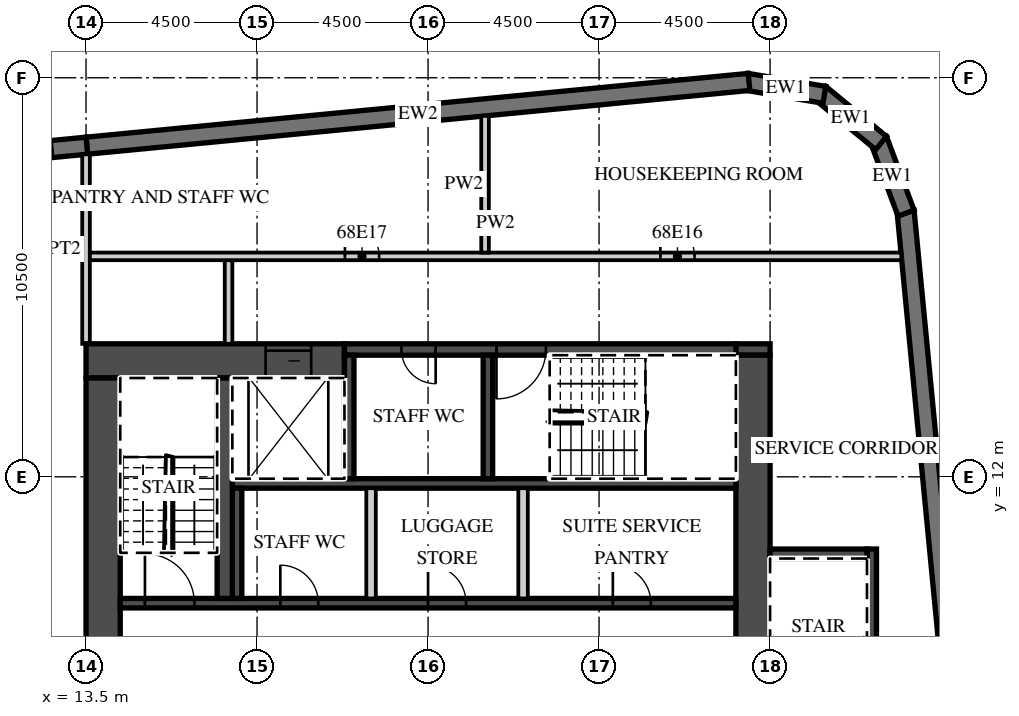
"""IFC4 building model, lengths in metres.
Left out: names, types, materials, properties, quantities, classifications, styles, units other than length and angle.
Written with IfcOpenShell. Run it as: python <this file> out.ifc"""

import sys

from ifc_helpers import new_model, si_unit, direction, frame, frame_2d, origin, place, context, subcontext, project, spatial, polyline, rectangle, outline, extrude, element, fill, save


model = new_model("IFC4")
c1 = context("Model", 3, precision=1e-05, world=origin(), true_north=direction((0.0, 1.0)))
c2 = subcontext(c1, "Body", "Model", "MODEL_VIEW")
j1 = project(units=[si_unit("LENGTHUNIT", "METRE"), si_unit("PLANEANGLEUNIT", "RADIAN")], contexts=[c1])
p1 = place(None, origin())
s1 = spatial("IfcSite", under=j1, at=p1, CompositionType="ELEMENT")
p2 = place(p1, origin())
s2 = spatial("IfcBuilding", under=s1, at=p2, CompositionType="ELEMENT")
p3 = place(p2, frame((0.0, 0.0, 275.1)))
s3 = spatial("IfcBuildingStorey", under=s2, at=p3, CompositionType="ELEMENT", Elevation=275.1)
p4 = place(p3, frame((38.132, -12.858, 0.0), z_axis=(0.0, 0.0, 1.0), x_axis=(-0.095847749461, 0.995396006082, 0.0)))
e1 = element("IfcWall", 1, at=p4, inside=s3, PredefinedType="SOLIDWALL", context=c2, shape_type="SweptSolid", body=[
    extrude(rectangle(XDim=32.0, YDim=0.45, at=frame_2d((16.0, 0.0))), origin(), (0.0, 0.0, 1.0), 3.02),
])
p5 = place(p3, frame((35.078, 18.938, 0.0), z_axis=(0.0, 0.0, 1.0), x_axis=(-0.350192909346, 0.936677599948, 0.0)))
e2 = element("IfcWall", 2, at=p5, inside=s3, PredefinedType="SOLIDWALL", context=c2, shape_type="SweptSolid", body=[
    extrude(outline(polyline([(0.0, -0.225), (2.071, -0.225), (1.95, 0.225), (0.121, 0.225), (0.0, -0.225)])), origin(), (0.0, 0.0, 1.0), 3.02),
])
p6 = place(p3, frame((34.421, 20.782, 0.0), z_axis=(0.0, 0.0, 1.0), x_axis=(-0.771593176315, 0.636116318187, 0.0)))
e3 = element("IfcWall", 3, at=p6, inside=s3, PredefinedType="SOLIDWALL", context=c2, shape_type="SweptSolid", body=[
    extrude(outline(polyline([(0.0, -0.225), (2.071, -0.225), (1.95, 0.225), (0.12, 0.225), (0.0, -0.225)])), origin(), (0.0, 0.0, 1.0), 3.02),
])
p7 = place(p3, frame((32.929, 22.051, 0.0), z_axis=(0.0, 0.0, 1.0), x_axis=(-0.986298144721, 0.164972633245, 0.0)))
e4 = element("IfcWall", 4, at=p7, inside=s3, PredefinedType="SOLIDWALL", context=c2, shape_type="SweptSolid", body=[
    extrude(outline(polyline([(0.0, -0.225), (2.07, -0.225), (1.95, 0.225), (0.121, 0.225), (0.0, -0.225)])), origin(), (0.0, 0.0, 1.0), 3.02),
])
p8 = place(p3, frame((30.946, 22.391, 0.0), z_axis=(0.0, 0.0, 1.0), x_axis=(-0.995396397117, -0.095843688398, 0.0)))
e5 = element("IfcWall", 5, at=p8, inside=s3, PredefinedType="SOLIDWALL", context=c2, shape_type="SweptSolid", body=[
    extrude(rectangle(XDim=17.505, YDim=0.45, at=frame_2d((8.752, 0.0))), origin(), (0.0, 0.0, 1.0), 3.02),
])
p9 = place(p3, frame((13.521, 20.713, 0.0), z_axis=(0.0, 0.0, 1.0), x_axis=(-0.995396277313, -0.095844932638, 0.0)))
e6 = element("IfcWall", 6, at=p9, inside=s3, PredefinedType="SOLIDWALL", context=c2, shape_type="SweptSolid", body=[
    extrude(rectangle(XDim=51.495, YDim=0.45, at=frame_2d((25.748, 0.0))), origin(), (0.0, 0.0, 1.0), 3.02),
])
p10 = place(p9, frame((0.91, 0.0, 0.45)))
e7 = element("IfcOpeningElement", 7, at=p10, cuts=e6, PredefinedType="OPENING", context=c2, shape_type="SweptSolid", body=[
    extrude(rectangle(XDim=2.7, YDim=2.25, at=frame_2d((1.35, 1.125))), frame((0.0, 0.235, 0.0), z_axis=(0.0, -1.0, 0.0), x_axis=(1.0, 0.0, 0.0)), (0.0, 0.0, 1.0), 0.47),
])
p11 = place(p9, frame((5.431, 0.0, 0.45)))
e8 = element("IfcOpeningElement", 8, at=p11, cuts=e6, PredefinedType="OPENING", context=c2, shape_type="SweptSolid", body=[
    extrude(rectangle(XDim=2.7, YDim=2.25, at=frame_2d((1.35, 1.125))), frame((0.0, 0.235, 0.0), z_axis=(0.0, -1.0, 0.0), x_axis=(1.0, 0.0, 0.0)), (0.0, 0.0, 1.0), 0.47),
])
p12 = place(p9, frame((9.952, 0.0, 0.45)))
e9 = element("IfcOpeningElement", 9, at=p12, cuts=e6, PredefinedType="OPENING", context=c2, shape_type="SweptSolid", body=[
    extrude(rectangle(XDim=2.7, YDim=2.25, at=frame_2d((1.35, 1.125))), frame((0.0, 0.235, 0.0), z_axis=(0.0, -1.0, 0.0), x_axis=(1.0, 0.0, 0.0)), (0.0, 0.0, 1.0), 0.47),
])
p13 = place(p9, frame((14.473, 0.0, 0.45)))
e10 = element("IfcOpeningElement", 10, at=p13, cuts=e6, PredefinedType="OPENING", context=c2, shape_type="SweptSolid", body=[
    extrude(rectangle(XDim=2.7, YDim=2.25, at=frame_2d((1.35, 1.125))), frame((0.0, 0.235, 0.0), z_axis=(0.0, -1.0, 0.0), x_axis=(1.0, 0.0, 0.0)), (0.0, 0.0, 1.0), 0.47),
])
p14 = place(p9, frame((18.994, 0.0, 0.45)))
e11 = element("IfcOpeningElement", 11, at=p14, cuts=e6, PredefinedType="OPENING", context=c2, shape_type="SweptSolid", body=[
    extrude(rectangle(XDim=2.7, YDim=2.25, at=frame_2d((1.35, 1.125))), frame((0.0, 0.235, 0.0), z_axis=(0.0, -1.0, 0.0), x_axis=(1.0, 0.0, 0.0)), (0.0, 0.0, 1.0), 0.47),
])
p15 = place(p9, frame((23.514, 0.0, 0.45)))
e12 = element("IfcOpeningElement", 12, at=p15, cuts=e6, PredefinedType="OPENING", context=c2, shape_type="SweptSolid", body=[
    extrude(rectangle(XDim=2.7, YDim=2.25, at=frame_2d((1.35, 1.125))), frame((0.0, 0.235, 0.0), z_axis=(0.0, -1.0, 0.0), x_axis=(1.0, 0.0, 0.0)), (0.0, 0.0, 1.0), 0.47),
])
p16 = place(p9, frame((28.035, 0.0, 0.45)))
e13 = element("IfcOpeningElement", 13, at=p16, cuts=e6, PredefinedType="OPENING", context=c2, shape_type="SweptSolid", body=[
    extrude(rectangle(XDim=2.7, YDim=2.25, at=frame_2d((1.35, 1.125))), frame((0.0, 0.235, 0.0), z_axis=(0.0, -1.0, 0.0), x_axis=(1.0, 0.0, 0.0)), (0.0, 0.0, 1.0), 0.47),
])
p17 = place(p9, frame((32.556, 0.0, 0.45)))
e14 = element("IfcOpeningElement", 14, at=p17, cuts=e6, PredefinedType="OPENING", context=c2, shape_type="SweptSolid", body=[
    extrude(rectangle(XDim=2.7, YDim=2.25, at=frame_2d((1.35, 1.125))), frame((0.0, 0.235, 0.0), z_axis=(0.0, -1.0, 0.0), x_axis=(1.0, 0.0, 0.0)), (0.0, 0.0, 1.0), 0.47),
])
p18 = place(p9, frame((37.077, 0.0, 0.45)))
e15 = element("IfcOpeningElement", 15, at=p18, cuts=e6, PredefinedType="OPENING", context=c2, shape_type="SweptSolid", body=[
    extrude(rectangle(XDim=2.7, YDim=2.25, at=frame_2d((1.35, 1.125))), frame((0.0, 0.235, 0.0), z_axis=(0.0, -1.0, 0.0), x_axis=(1.0, 0.0, 0.0)), (0.0, 0.0, 1.0), 0.47),
])
p19 = place(p9, frame((41.598, 0.0, 0.45)))
e16 = element("IfcOpeningElement", 16, at=p19, cuts=e6, PredefinedType="OPENING", context=c2, shape_type="SweptSolid", body=[
    extrude(rectangle(XDim=2.7, YDim=2.25, at=frame_2d((1.35, 1.125))), frame((0.0, 0.235, 0.0), z_axis=(0.0, -1.0, 0.0), x_axis=(1.0, 0.0, 0.0)), (0.0, 0.0, 1.0), 0.47),
])
p20 = place(p9, frame((46.118, 0.0, 0.45)))
e17 = element("IfcOpeningElement", 17, at=p20, cuts=e6, PredefinedType="OPENING", context=c2, shape_type="SweptSolid", body=[
    extrude(rectangle(XDim=2.7, YDim=2.25, at=frame_2d((1.35, 1.125))), frame((0.0, 0.235, 0.0), z_axis=(0.0, -1.0, 0.0), x_axis=(1.0, 0.0, 0.0)), (0.0, 0.0, 1.0), 0.47),
])
p21 = place(p3, frame((13.5, 15.5, 0.0), z_axis=(0.0, 0.0, 1.0), x_axis=(0.0, 1.0, 0.0)))
e18 = element("IfcWall", 18, at=p21, inside=s3, PredefinedType="PARTITIONING", context=c2, shape_type="SweptSolid", body=[
    extrude(rectangle(XDim=4.985, YDim=0.2, at=frame_2d((2.493, 0.0))), origin(), (0.0, 0.0, 1.0), 3.02),
])
p22 = place(p3, frame((13.5, 15.05, 0.0), z_axis=(0.0, 0.0, 1.0), x_axis=(1.0, 0.0, 0.0)))
e19 = element("IfcWall", 19, at=p22, inside=s3, PredefinedType="SHEAR", context=c2, shape_type="SweptSolid", body=[
    extrude(rectangle(XDim=6.8, YDim=0.9, at=frame_2d((3.4, 0.0))), origin(), (0.0, 0.0, 1.0), 3.02),
])
p23 = place(p22, frame((4.725, 0.0, 0.0)))
e20 = element("IfcOpeningElement", 20, at=p23, cuts=e19, PredefinedType="OPENING", context=c2, shape_type="SweptSolid", body=[
    extrude(rectangle(XDim=1.2, YDim=2.1, at=frame_2d((0.6, 1.05))), frame((0.0, 0.46, 0.0), z_axis=(0.0, -1.0, 0.0), x_axis=(1.0, 0.0, 0.0)), (0.0, 0.0, 1.0), 0.92),
])
p24 = place(p3, frame((30.6, 15.35, 0.0), z_axis=(0.0, 0.0, 1.0), x_axis=(1.0, 0.0, 0.0)))
e21 = element("IfcWall", 21, at=p24, inside=s3, PredefinedType="SHEAR", context=c2, shape_type="SweptSolid", body=[
    extrude(rectangle(XDim=0.9, YDim=0.3, at=frame_2d((0.45, 0.0))), origin(), (0.0, 0.0, 1.0), 3.02),
])
p25 = place(p3, frame((20.3, 15.35, 0.0), z_axis=(0.0, 0.0, 1.0), x_axis=(1.0, 0.0, 0.0)))
e22 = element("IfcWall", 22, at=p25, inside=s3, PredefinedType="SHEAR", context=c2, shape_type="SweptSolid", body=[
    extrude(rectangle(XDim=10.3, YDim=0.3, at=frame_2d((5.15, 0.0))), origin(), (0.0, 0.0, 1.0), 3.02),
])
p26 = place(p25, frame((4.0, 0.0, 0.0)))
e23 = element("IfcOpeningElement", 23, at=p26, cuts=e22, PredefinedType="OPENING", context=c2, shape_type="SweptSolid", body=[
    extrude(rectangle(XDim=1.3, YDim=2.1, at=frame_2d((0.65, 1.05))), frame((0.0, 0.16, 0.0), z_axis=(0.0, -1.0, 0.0), x_axis=(1.0, 0.0, 0.0)), (0.0, 0.0, 1.0), 0.32),
])
p27 = place(p25, frame((1.5, 0.0, 0.0)))
e24 = element("IfcOpeningElement", 24, at=p27, cuts=e22, PredefinedType="OPENING", context=c2, shape_type="SweptSolid", body=[
    extrude(rectangle(XDim=0.9, YDim=2.1, at=frame_2d((0.45, 1.05))), frame((0.0, 0.16, 0.0), z_axis=(0.0, -1.0, 0.0), x_axis=(1.0, 0.0, 0.0)), (0.0, 0.0, 1.0), 0.32),
])
p28 = place(p3, frame((31.05, 2.4, 0.0), z_axis=(0.0, 0.0, 1.0), x_axis=(0.0, 1.0, 0.0)))
e25 = element("IfcWall", 25, at=p28, inside=s3, PredefinedType="SHEAR", context=c2, shape_type="SweptSolid", body=[
    extrude(rectangle(XDim=12.8, YDim=0.9, at=frame_2d((6.4, 0.0))), origin(), (0.0, 0.0, 1.0), 3.02),
])
p29 = place(p28, frame((0.2, 0.0, 0.0)))
e26 = element("IfcOpeningElement", 26, at=p29, cuts=e25, PredefinedType="OPENING", context=c2, shape_type="SweptSolid", body=[
    extrude(rectangle(XDim=1.1, YDim=2.1, at=frame_2d((0.55, 1.05))), frame((0.0, 0.46, 0.0), z_axis=(0.0, -1.0, 0.0), x_axis=(1.0, 0.0, 0.0)), (0.0, 0.0, 1.0), 0.92),
])
p30 = place(p3, frame((13.95, 2.4, 0.0), z_axis=(0.0, 0.0, 1.0), x_axis=(0.0, 1.0, 0.0)))
e27 = element("IfcWall", 27, at=p30, inside=s3, PredefinedType="SHEAR", context=c2, shape_type="SweptSolid", body=[
    extrude(rectangle(XDim=12.2, YDim=0.9, at=frame_2d((6.1, 0.0))), origin(), (0.0, 0.0, 1.0), 3.02),
])
p31 = place(p3, frame((14.4, 8.675, 0.0), z_axis=(0.0, 0.0, 1.0), x_axis=(1.0, 0.0, 0.0)))
e28 = element("IfcWall", 28, at=p31, inside=s3, PredefinedType="SHEAR", context=c2, shape_type="SweptSolid", body=[
    extrude(rectangle(XDim=16.2, YDim=0.25, at=frame_2d((8.1, 0.0))), origin(), (0.0, 0.0, 1.0), 3.02),
])
p32 = place(p31, frame((0.65, 0.0, 0.0)))
e29 = element("IfcOpeningElement", 29, at=p32, cuts=e28, PredefinedType="OPENING", context=c2, shape_type="SweptSolid", body=[
    extrude(rectangle(XDim=1.3, YDim=2.1, at=frame_2d((0.65, 1.05))), frame((0.0, 0.135, 0.0), z_axis=(0.0, -1.0, 0.0), x_axis=(1.0, 0.0, 0.0)), (0.0, 0.0, 1.0), 0.27),
])
p33 = place(p31, frame((12.962, 0.0, 0.0)))
e30 = element("IfcOpeningElement", 30, at=p33, cuts=e28, PredefinedType="OPENING", context=c2, shape_type="SweptSolid", body=[
    extrude(rectangle(XDim=1.0, YDim=2.1, at=frame_2d((0.5, 1.05))), frame((0.0, 0.135, 0.0), z_axis=(0.0, -1.0, 0.0), x_axis=(1.0, 0.0, 0.0)), (0.0, 0.0, 1.0), 0.27),
])
p34 = place(p31, frame((8.1, 0.0, 0.0)))
e31 = element("IfcOpeningElement", 31, at=p34, cuts=e28, PredefinedType="OPENING", context=c2, shape_type="SweptSolid", body=[
    extrude(rectangle(XDim=1.0, YDim=2.1, at=frame_2d((0.5, 1.05))), frame((0.0, 0.135, 0.0), z_axis=(0.0, -1.0, 0.0), x_axis=(1.0, 0.0, 0.0)), (0.0, 0.0, 1.0), 0.27),
])
p35 = place(p31, frame((4.212, 0.0, 0.0)))
e32 = element("IfcOpeningElement", 32, at=p35, cuts=e28, PredefinedType="OPENING", context=c2, shape_type="SweptSolid", body=[
    extrude(rectangle(XDim=1.0, YDim=2.1, at=frame_2d((0.5, 1.05))), frame((0.0, 0.135, 0.0), z_axis=(0.0, -1.0, 0.0), x_axis=(1.0, 0.0, 0.0)), (0.0, 0.0, 1.0), 0.27),
])
p36 = place(p3, frame((17.35, 11.825, 0.0), z_axis=(0.0, 0.0, 1.0), x_axis=(1.0, 0.0, 0.0)))
e33 = element("IfcWall", 33, at=p36, inside=s3, PredefinedType="SHEAR", context=c2, shape_type="SweptSolid", body=[
    extrude(rectangle(XDim=13.25, YDim=0.25, at=frame_2d((6.625, 0.0))), origin(), (0.0, 0.0, 1.0), 3.02),
])
p37 = place(p3, frame((17.475, 8.8, 0.0), z_axis=(0.0, 0.0, 1.0), x_axis=(0.0, 1.0, 0.0)))
e34 = element("IfcWall", 34, at=p37, inside=s3, PredefinedType="SHEAR", context=c2, shape_type="SweptSolid", body=[
    extrude(rectangle(XDim=2.9, YDim=0.25, at=frame_2d((1.45, 0.0))), origin(), (0.0, 0.0, 1.0), 3.02),
])
for number, where, z_axis, x_axis in (
    (35, (25.0, 8.8, 0.0), (0.0, 0.0, 1.0), (0.0, 1.0, 0.0)),
    (36, (21.0, 8.8, 0.0), (0.0, 0.0, 1.0), (0.0, 1.0, 0.0)),
):
    element("IfcWall", number, at=place(p3, frame(where, z_axis=z_axis, x_axis=x_axis)), inside=s3, PredefinedType="PARTITIONING", context=c2, shape_type="SweptSolid", body=[
        extrude(rectangle(XDim=2.9, YDim=0.25, at=frame_2d((1.45, 0.0))), origin(), (0.0, 0.0, 1.0), 3.02),
    ])
p38 = place(p3, frame((17.15, 8.8, 0.0), z_axis=(0.0, 0.0, 1.0), x_axis=(0.0, 1.0, 0.0)))
e37 = element("IfcWall", 37, at=p38, inside=s3, PredefinedType="SHEAR", context=c2, shape_type="SweptSolid", body=[
    extrude(rectangle(XDim=5.8, YDim=0.4, at=frame_2d((2.9, 0.0))), origin(), (0.0, 0.0, 1.0), 3.02),
])
for number, where, z_axis, x_axis in (
    (38, (20.425, 11.95, 0.0), (0.0, 0.0, 1.0), (0.0, 1.0, 0.0)),
    (39, (24.075, 11.95, 0.0), (0.0, 0.0, 1.0), (0.0, 1.0, 0.0)),
):
    element("IfcWall", number, at=place(p3, frame(where, z_axis=z_axis, x_axis=x_axis)), inside=s3, PredefinedType="SHEAR", context=c2, shape_type="SweptSolid", body=[
        extrude(rectangle(XDim=3.25, YDim=0.25, at=frame_2d((1.625, 0.0))), origin(), (0.0, 0.0, 1.0), 3.02),
    ])
p39 = place(p3, frame((34.175, 1.75, 0.0), z_axis=(0.0, 0.0, 1.0), x_axis=(0.0, 1.0, 0.0)))
e40 = element("IfcWall", 40, at=p39, inside=s3, PredefinedType="SHEAR", context=c2, shape_type="SweptSolid", body=[
    extrude(rectangle(XDim=8.35, YDim=0.25, at=frame_2d((4.175, 0.0))), origin(), (0.0, 0.0, 1.0), 3.02),
])
p40 = place(p3, frame((31.5, 9.975, 0.0), z_axis=(0.0, 0.0, 1.0), x_axis=(1.0, 0.0, 0.0)))
e41 = element("IfcWall", 41, at=p40, inside=s3, PredefinedType="SHEAR", context=c2, shape_type="SweptSolid", body=[
    extrude(rectangle(XDim=2.55, YDim=0.25, at=frame_2d((1.275, 0.0))), origin(), (0.0, 0.0, 1.0), 3.02),
])
p41 = place(p3, frame((17.25, 15.5, 0.0), z_axis=(0.0, 0.0, 1.0), x_axis=(0.0, 1.0, 0.0)))
e42 = element("IfcWall", 42, at=p41, inside=s3, PredefinedType="PARTITIONING", context=c2, shape_type="SweptSolid", body=[
    extrude(rectangle(XDim=2.2, YDim=0.2, at=frame_2d((1.1, 0.0))), origin(), (0.0, 0.0, 1.0), 3.02),
])
p42 = place(p3, frame((13.6, 17.8, 0.0), z_axis=(0.0, 0.0, 1.0), x_axis=(1.0, 0.0, 0.0)))
e43 = element("IfcWall", 43, at=p42, inside=s3, PredefinedType="PARTITIONING", context=c2, shape_type="SweptSolid", body=[
    extrude(rectangle(XDim=21.354, YDim=0.2, at=frame_2d((10.677, 0.0))), origin(), (0.0, 0.0, 1.0), 3.02),
])
p43 = place(p42, frame((15.012, 0.0, 0.0)))
e44 = element("IfcOpeningElement", 44, at=p43, cuts=e43, PredefinedType="OPENING", context=c2, shape_type="SweptSolid", body=[
    extrude(rectangle(XDim=0.9, YDim=2.1, at=frame_2d((0.45, 1.05))), frame((0.0, 0.11, 0.0), z_axis=(0.0, -1.0, 0.0), x_axis=(1.0, 0.0, 0.0)), (0.0, 0.0, 1.0), 0.22),
])
p44 = place(p42, frame((6.712, 0.0, 0.0)))
e45 = element("IfcOpeningElement", 45, at=p44, cuts=e43, PredefinedType="OPENING", context=c2, shape_type="SweptSolid", body=[
    extrude(rectangle(XDim=0.9, YDim=2.1, at=frame_2d((0.45, 1.05))), frame((0.0, 0.11, 0.0), z_axis=(0.0, -1.0, 0.0), x_axis=(1.0, 0.0, 0.0)), (0.0, 0.0, 1.0), 0.22),
])
p45 = place(p3, frame((24.0, 17.9, 0.0), z_axis=(0.0, 0.0, 1.0), x_axis=(0.0, 1.0, 0.0)))
e46 = element("IfcWall", 46, at=p45, inside=s3, PredefinedType="PARTITIONING", context=c2, shape_type="SweptSolid", body=[
    extrude(rectangle(XDim=3.597, YDim=0.2, at=frame_2d((1.798, 0.0))), origin(), (0.0, 0.0, 1.0), 3.02),
])
p46 = place(p10, origin())
e47 = element("IfcWindow", 47, at=p46, inside=s3, PartitioningType="SINGLE_PANEL", PredefinedType="WINDOW", context=c2, shape_type="SweptSolid", body=[
    extrude(rectangle(XDim=2.7, YDim=2.25, at=frame_2d((1.35, 1.125))), frame((0.0, 0.09, 0.0), z_axis=(0.0, -1.0, 0.0), x_axis=(1.0, 0.0, 0.0)), (0.0, 0.0, 1.0), 0.06),
])
fill(e7, e47)
p47 = place(p23, origin())
e48 = element("IfcDoor", 48, at=p47, inside=s3, OperationType="SLIDING_TO_LEFT", PredefinedType="DOOR", context=c2, shape_type="SweptSolid", body=[
    extrude(rectangle(XDim=1.2, YDim=2.1, at=frame_2d((0.6, 1.05))), frame((0.0, 0.025, 0.0), z_axis=(0.0, -1.0, 0.0), x_axis=(1.0, 0.0, 0.0)), (0.0, 0.0, 1.0), 0.05),
])
fill(e20, e48)
p48 = place(p32, origin())
e49 = element("IfcDoor", 49, at=p48, inside=s3, OperationType="SINGLE_SWING_LEFT", PredefinedType="DOOR", context=c2, shape_type="SweptSolid", body=[
    extrude(rectangle(XDim=1.3, YDim=2.1, at=frame_2d((0.65, 1.05))), frame((0.0, 0.025, 0.0), z_axis=(0.0, -1.0, 0.0), x_axis=(1.0, 0.0, 0.0)), (0.0, 0.0, 1.0), 0.05),
])
fill(e29, e49)
p49 = place(p26, origin())
e50 = element("IfcDoor", 50, at=p49, inside=s3, OperationType="SINGLE_SWING_LEFT", PredefinedType="DOOR", context=c2, shape_type="SweptSolid", body=[
    extrude(rectangle(XDim=1.3, YDim=2.1, at=frame_2d((0.65, 1.05))), frame((0.0, 0.025, 0.0), z_axis=(0.0, -1.0, 0.0), x_axis=(1.0, 0.0, 0.0)), (0.0, 0.0, 1.0), 0.05),
])
fill(e23, e50)
p50 = place(p27, origin())
e51 = element("IfcDoor", 51, at=p50, inside=s3, OperationType="SINGLE_SWING_RIGHT", PredefinedType="DOOR", context=c2, shape_type="SweptSolid", body=[
    extrude(rectangle(XDim=0.9, YDim=2.1, at=frame_2d((0.45, 1.05))), frame((0.0, 0.025, 0.0), z_axis=(0.0, -1.0, 0.0), x_axis=(1.0, 0.0, 0.0)), (0.0, 0.0, 1.0), 0.05),
])
fill(e24, e51)
p51 = place(p33, origin())
e52 = element("IfcDoor", 52, at=p51, inside=s3, OperationType="SINGLE_SWING_LEFT", PredefinedType="DOOR", context=c2, shape_type="SweptSolid", body=[
    extrude(rectangle(XDim=1.0, YDim=2.1, at=frame_2d((0.5, 1.05))), frame((0.0, 0.025, 0.0), z_axis=(0.0, -1.0, 0.0), x_axis=(1.0, 0.0, 0.0)), (0.0, 0.0, 1.0), 0.05),
])
fill(e30, e52)
p52 = place(p34, origin())
e53 = element("IfcDoor", 53, at=p52, inside=s3, OperationType="SINGLE_SWING_LEFT", PredefinedType="DOOR", context=c2, shape_type="SweptSolid", body=[
    extrude(rectangle(XDim=1.0, YDim=2.1, at=frame_2d((0.5, 1.05))), frame((0.0, 0.025, 0.0), z_axis=(0.0, -1.0, 0.0), x_axis=(1.0, 0.0, 0.0)), (0.0, 0.0, 1.0), 0.05),
])
fill(e31, e53)
p53 = place(p35, origin())
e54 = element("IfcDoor", 54, at=p53, inside=s3, OperationType="SINGLE_SWING_LEFT", PredefinedType="DOOR", context=c2, shape_type="SweptSolid", body=[
    extrude(rectangle(XDim=1.0, YDim=2.1, at=frame_2d((0.5, 1.05))), frame((0.0, 0.025, 0.0), z_axis=(0.0, -1.0, 0.0), x_axis=(1.0, 0.0, 0.0)), (0.0, 0.0, 1.0), 0.05),
])
fill(e32, e54)
p54 = place(p43, origin())
e55 = element("IfcDoor", 55, at=p54, inside=s3, OperationType="SINGLE_SWING_LEFT", PredefinedType="DOOR", context=c2, shape_type="SweptSolid", body=[
    extrude(rectangle(XDim=0.9, YDim=2.1, at=frame_2d((0.45, 1.05))), frame((0.0, 0.025, 0.0), z_axis=(0.0, -1.0, 0.0), x_axis=(1.0, 0.0, 0.0)), (0.0, 0.0, 1.0), 0.05),
])
fill(e44, e55)
p55 = place(p44, origin())
e56 = element("IfcDoor", 56, at=p55, inside=s3, OperationType="SINGLE_SWING_LEFT", PredefinedType="DOOR", context=c2, shape_type="SweptSolid", body=[
    extrude(rectangle(XDim=0.9, YDim=2.1, at=frame_2d((0.45, 1.05))), frame((0.0, 0.025, 0.0), z_axis=(0.0, -1.0, 0.0), x_axis=(1.0, 0.0, 0.0)), (0.0, 0.0, 1.0), 0.05),
])
fill(e45, e56)
save(model, sys.argv[1])
